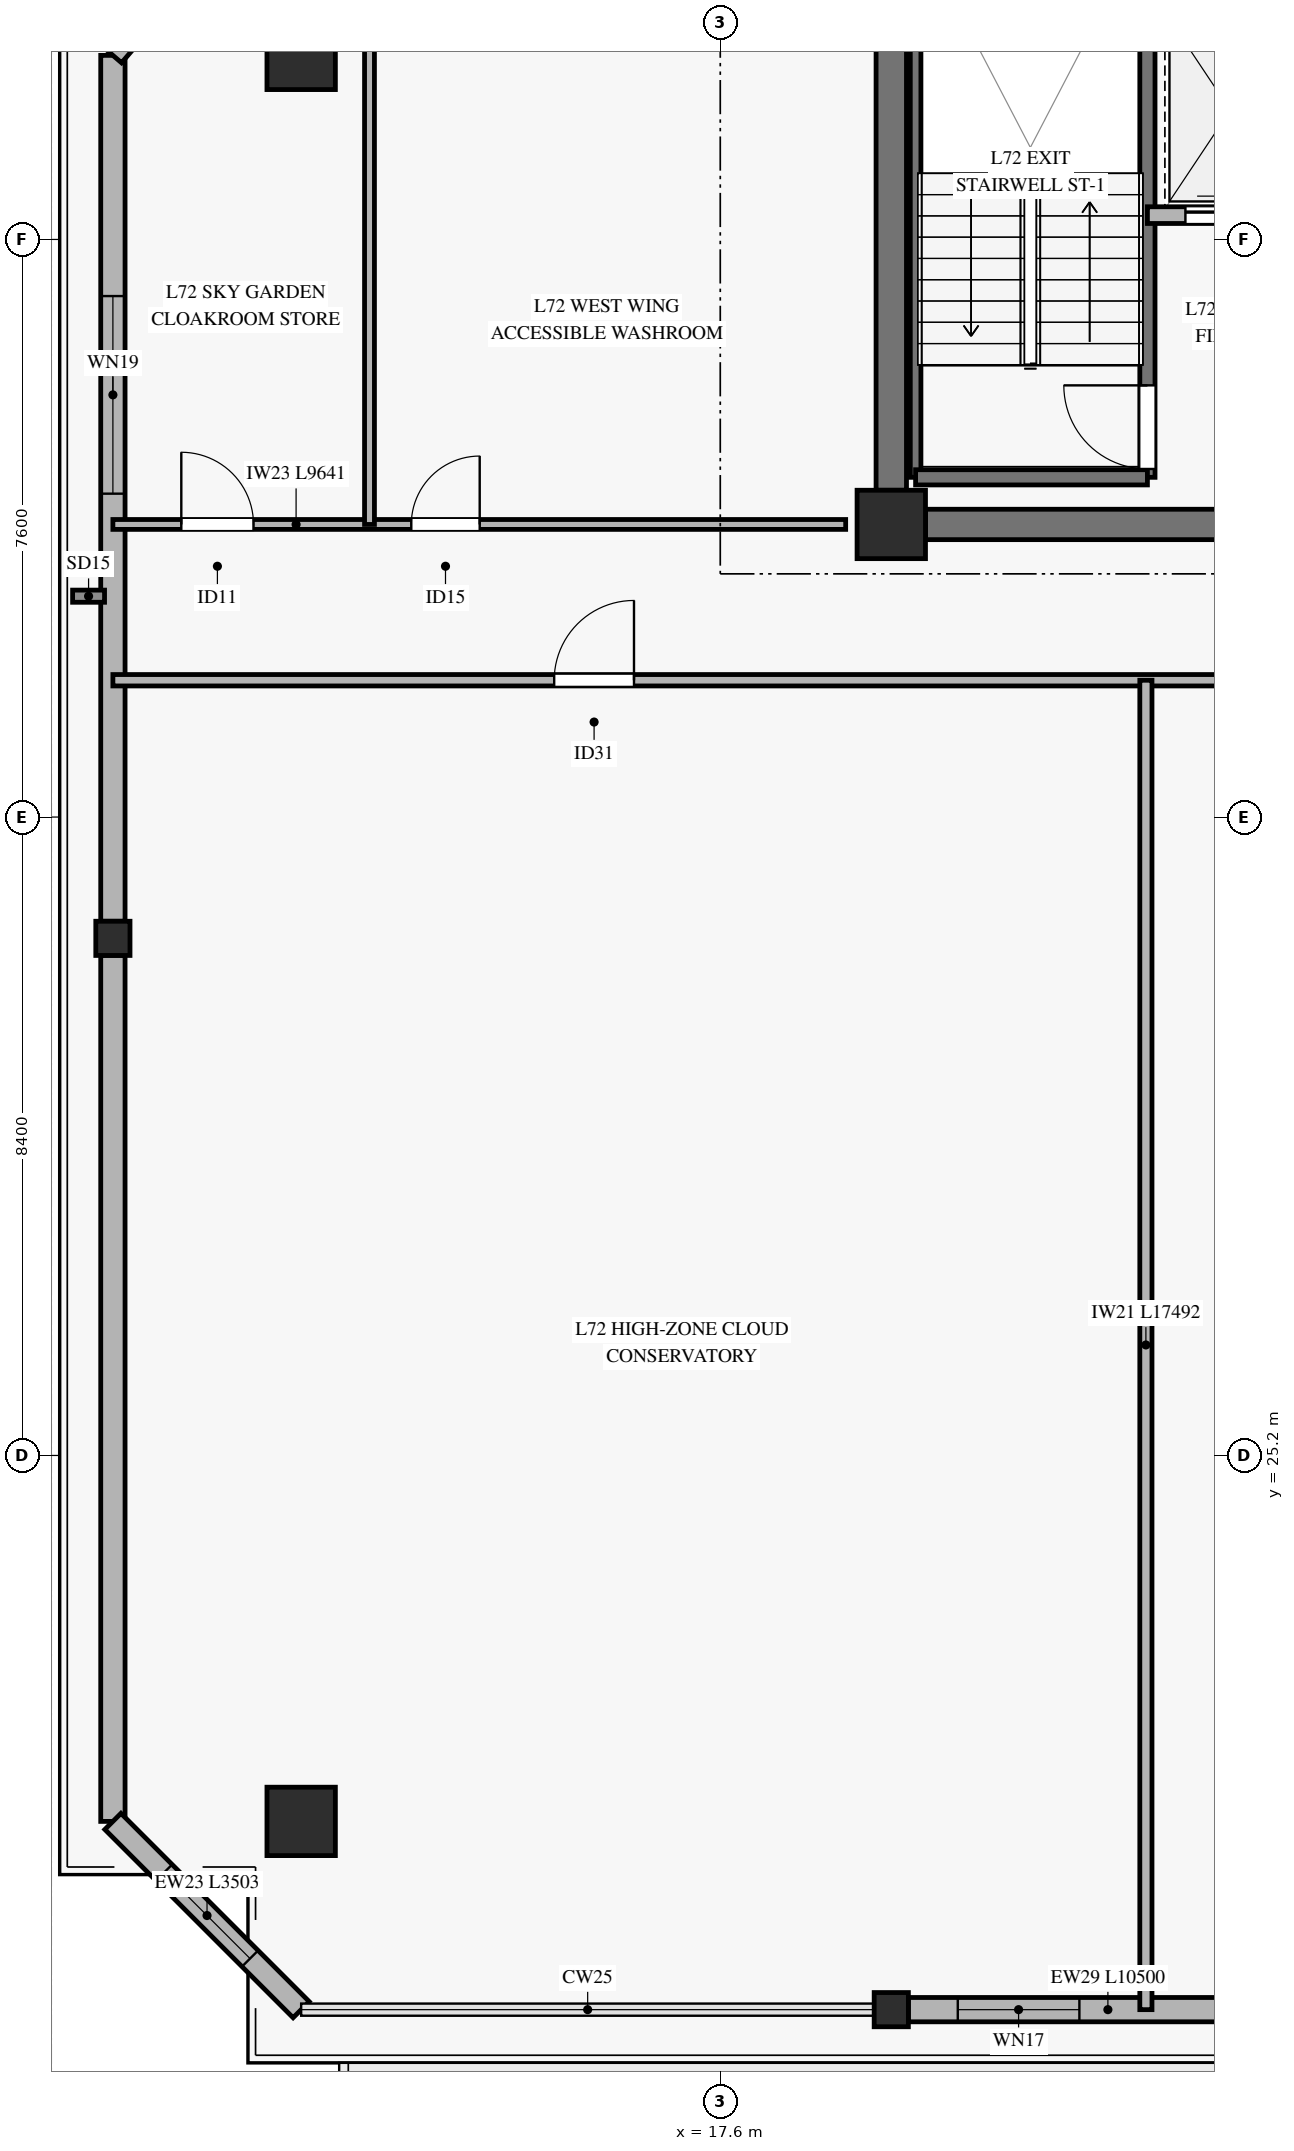
"""IFC4 building model, lengths in metres.
Left out: names, types, materials, properties, quantities, classifications, styles, units other than length and angle.
Written with IfcOpenShell. Run it as: python <this file> out.ifc"""

import sys

from ifc_helpers import new_model, si_unit, direction, frame, frame_2d, origin, origin_2d, place, context, subcontext, project, spatial, rectangle, hollow_rectangle, extrude, source, transform, mapped, element, fill, save


model = new_model("IFC4")
c1 = context("Model", 3, precision=1e-05, world=origin(), true_north=direction((0.0, 1.0)))
c2 = subcontext(c1, "Body", "Model", "MODEL_VIEW")
j1 = project(units=[si_unit("LENGTHUNIT", "METRE"), si_unit("PLANEANGLEUNIT", "RADIAN")], contexts=[c1])
p1 = place(None, origin())
s1 = spatial("IfcSite", under=j1, at=p1, CompositionType="ELEMENT")
p2 = place(p1, origin())
s2 = spatial("IfcBuilding", under=s1, at=p2, CompositionType="ELEMENT")
p3 = place(p2, frame((0.0, 0.0, 279.1)))
s3 = spatial("IfcBuildingStorey", under=s2, at=p3, CompositionType="ELEMENT", Elevation=279.1)
m1 = source(origin(), c2, "Body", "SweptSolid", [
    extrude(rectangle(XDim=0.9, YDim=0.9, at=origin_2d()), origin(), (0.0, 0.0, 1.0), 6.52),
])
p4 = place(p3, frame((19.85, 37.45, 0.0), z_axis=(0.0, 0.0, 1.0), x_axis=(1.0, 0.0, 0.0)))
e1 = element("IfcColumn", 1, at=p4, inside=s3, PredefinedType="PILASTER", context=c2, shape_type="MappedRepresentation", body=[
    mapped(m1, transform((0.0, 0.0, 0.0), x_axis=(1.0, 0.0, 0.0), y_axis=(0.0, 1.0, 0.0), z_axis=(0.0, 0.0, 1.0), scale=1.0)),
])
p5 = place(p3, frame((20.3, 37.45, 0.0), z_axis=(0.0, 0.0, 1.0), x_axis=(1.0, 0.0, 0.0)))
e2 = element("IfcWall", 2, at=p5, inside=s3, PredefinedType="SHEAR", context=c2, shape_type="SweptSolid", body=[
    extrude(rectangle(XDim=10.05, YDim=0.4, at=frame_2d((5.025, 0.0))), origin(), (0.0, 0.0, 1.0), 6.52),
])
p6 = place(p5, frame((4.25, 0.0, 0.0)))
e3 = element("IfcOpeningElement", 3, at=p6, cuts=e2, PredefinedType="OPENING", context=c2, shape_type="SweptSolid", body=[
    extrude(rectangle(XDim=1.2, YDim=2.15, at=frame_2d((0.6, 1.075))), frame((0.0, 0.21, 0.0), z_axis=(0.0, -1.0, 0.0), x_axis=(1.0, 0.0, 0.0)), (0.0, 0.0, 1.0), 0.42),
])
p7 = place(p3, frame((19.85, 37.9, 0.0), z_axis=(0.0, 0.0, 1.0), x_axis=(0.0, 1.0, 0.0)))
e4 = element("IfcWall", 4, at=p7, inside=s3, PredefinedType="SHEAR", context=c2, shape_type="SweptSolid", body=[
    extrude(rectangle(XDim=8.2, YDim=0.4, at=frame_2d((4.1, 0.0))), origin(), (0.0, 0.0, 1.0), 6.52),
])
m2 = source(origin(), c2, "Body", "SweptSolid", [
    extrude(hollow_rectangle(XDim=0.9, YDim=0.9, WallThickness=0.04, at=origin_2d()), origin(), (0.0, 0.0, 1.0), 6.52),
])
for number, where, z_axis, x_axis in (
    (5, (12.086, 20.385, 0.0), (0.0, 0.0, 1.0), (1.0, 0.0, 0.0)),
    (6, (12.086, 43.622, 0.0), (0.0, 0.0, 1.0), (1.0, 0.0, 0.0)),
):
    element("IfcColumn", number, at=place(p3, frame(where, z_axis=z_axis, x_axis=x_axis)), inside=s3, PredefinedType="COLUMN", context=c2, shape_type="MappedRepresentation", body=[
        mapped(m2, transform((0.0, 0.0, 0.0), x_axis=(1.0, 0.0, 0.0), y_axis=(0.0, 1.0, 0.0), z_axis=(0.0, 0.0, 1.0), scale=1.0)),
    ])
m3 = source(origin(), c2, "Body", "SweptSolid", [
    extrude(hollow_rectangle(XDim=0.45, YDim=0.45, WallThickness=0.022, at=origin_2d()), origin(), (0.0, 0.0, 1.0), 6.52),
])
for number, where, z_axis, x_axis in (
    (7, (19.85, 17.908, 0.0), (0.0, 0.0, 1.0), (1.0, 0.0, 0.0)),
    (8, (9.609, 32.004, 0.0), (0.0, 0.0, 1.0), (1.0, 0.0, 0.0)),
):
    element("IfcColumn", number, at=place(p3, frame(where, z_axis=z_axis, x_axis=x_axis)), inside=s3, PredefinedType="COLUMN", context=c2, shape_type="MappedRepresentation", body=[
        mapped(m3, transform((0.0, 0.0, 0.0), x_axis=(1.0, 0.0, 0.0), y_axis=(0.0, 1.0, 0.0), z_axis=(0.0, 0.0, 1.0), scale=1.0)),
    ])
p8 = place(p3, frame((20.075, 17.908, 0.0), z_axis=(0.0, 0.0, 1.0), x_axis=(1.0, 0.0, 0.0)))
e9 = element("IfcWall", 9, at=p8, inside=s3, PredefinedType="SOLIDWALL", context=c2, shape_type="SweptSolid", body=[
    extrude(rectangle(XDim=10.5, YDim=0.32, at=frame_2d((5.25, 0.0))), origin(), (0.0, 0.0, 1.0), 6.15),
])
p9 = place(p8, frame((4.325, 0.0, 0.0)))
e10 = element("IfcOpeningElement", 10, at=p9, cuts=e9, PredefinedType="OPENING", context=c2, shape_type="SweptSolid", body=[
    extrude(rectangle(XDim=1.8, YDim=2.3, at=frame_2d((0.9, 1.15))), frame((0.0, 0.17, 0.0), z_axis=(0.0, -1.0, 0.0), x_axis=(1.0, 0.0, 0.0)), (0.0, 0.0, 1.0), 0.34),
])
p10 = place(p8, frame((0.65, 0.0, 0.45)))
e11 = element("IfcOpeningElement", 11, at=p10, cuts=e9, PredefinedType="OPENING", context=c2, shape_type="SweptSolid", body=[
    extrude(rectangle(XDim=1.6, YDim=2.0, at=frame_2d((0.8, 1.0))), frame((0.0, 0.17, 0.0), z_axis=(0.0, -1.0, 0.0), x_axis=(1.0, 0.0, 0.0)), (0.0, 0.0, 1.0), 0.34),
])
p11 = place(p8, frame((8.25, 0.0, 0.45)))
e12 = element("IfcOpeningElement", 12, at=p11, cuts=e9, PredefinedType="OPENING", context=c2, shape_type="SweptSolid", body=[
    extrude(rectangle(XDim=1.6, YDim=2.0, at=frame_2d((0.8, 1.0))), frame((0.0, 0.17, 0.0), z_axis=(0.0, -1.0, 0.0), x_axis=(1.0, 0.0, 0.0)), (0.0, 0.0, 1.0), 0.34),
])
p12 = place(p3, frame((9.609, 20.385, 0.0), z_axis=(0.0, 0.0, 1.0), x_axis=(0.0, 1.0, 0.0)))
e13 = element("IfcWall", 13, at=p12, inside=s3, PredefinedType="SOLIDWALL", context=c2, shape_type="SweptSolid", body=[
    extrude(rectangle(XDim=11.394, YDim=0.32, at=frame_2d((5.697, 0.0))), origin(), (0.0, 0.0, 1.0), 6.15),
])
p13 = place(p3, frame((9.609, 32.229, 0.0), z_axis=(0.0, 0.0, 1.0), x_axis=(0.0, 1.0, 0.0)))
e14 = element("IfcWall", 14, at=p13, inside=s3, PredefinedType="SOLIDWALL", context=c2, shape_type="SweptSolid", body=[
    extrude(rectangle(XDim=11.393, YDim=0.32, at=frame_2d((5.697, 0.0))), origin(), (0.0, 0.0, 1.0), 6.15),
])
p14 = place(p13, frame((5.626, 0.0, 0.45)))
e15 = element("IfcOpeningElement", 15, at=p14, cuts=e14, PredefinedType="OPENING", context=c2, shape_type="SweptSolid", body=[
    extrude(rectangle(XDim=2.6, YDim=2.4, at=frame_2d((1.3, 1.2))), frame((0.0, 0.17, 0.0), z_axis=(0.0, -1.0, 0.0), x_axis=(1.0, 0.0, 0.0)), (0.0, 0.0, 1.0), 0.34),
])
p15 = place(p3, frame((9.609, 20.385, 0.0), z_axis=(0.0, 0.0, 1.0), x_axis=(0.707106781187, -0.707106781187, 0.0)))
e16 = element("IfcWall", 16, at=p15, inside=s3, PredefinedType="SOLIDWALL", context=c2, shape_type="SweptSolid", body=[
    extrude(rectangle(XDim=3.503, YDim=0.3, at=frame_2d((1.751, 0.0))), origin(), (0.0, 0.0, 1.0), 6.15),
])
p16 = place(p15, frame((0.952, 0.0, 0.45)))
e17 = element("IfcOpeningElement", 17, at=p16, cuts=e16, PredefinedType="OPENING", context=c2, shape_type="SweptSolid", body=[
    extrude(rectangle(XDim=1.6, YDim=2.0, at=frame_2d((0.8, 1.0))), frame((0.0, 0.16, 0.0), z_axis=(0.0, -1.0, 0.0), x_axis=(1.0, 0.0, 0.0)), (0.0, 0.0, 1.0), 0.32),
])
p17 = place(p3, frame((11.861, 46.25, 0.0), z_axis=(0.0, 0.0, 1.0), x_axis=(-0.650739088715, -0.759301414735, 0.0)))
e18 = element("IfcWall", 18, at=p17, inside=s3, PredefinedType="SOLIDWALL", context=c2, shape_type="SweptSolid", body=[
    extrude(rectangle(XDim=3.461, YDim=0.3, at=frame_2d((1.73, 0.0))), origin(), (0.0, 0.0, 1.0), 6.15),
])
p18 = place(p17, frame((0.93, 0.0, 0.45)))
e19 = element("IfcOpeningElement", 19, at=p18, cuts=e18, PredefinedType="OPENING", context=c2, shape_type="SweptSolid", body=[
    extrude(rectangle(XDim=1.6, YDim=2.0, at=frame_2d((0.8, 1.0))), frame((0.0, 0.16, 0.0), z_axis=(0.0, -1.0, 0.0), x_axis=(1.0, 0.0, 0.0)), (0.0, 0.0, 1.0), 0.32),
])
p19 = place(p3, frame((20.17, 38.07, 0.0), z_axis=(0.0, 0.0, 1.0), x_axis=(0.0, 1.0, 0.0)))
e20 = element("IfcWall", 20, at=p19, inside=s3, PredefinedType="SOLIDWALL", context=c2, shape_type="SweptSolid", body=[
    extrude(rectangle(XDim=7.25, YDim=0.14, at=frame_2d((3.625, 0.0))), origin(), (0.0, 0.0, 1.0), 6.8),
])
p20 = place(p3, frame((23.22, 38.07, 0.0), z_axis=(0.0, 0.0, 1.0), x_axis=(0.0, 1.0, 0.0)))
e21 = element("IfcWall", 21, at=p20, inside=s3, PredefinedType="SOLIDWALL", context=c2, shape_type="SweptSolid", body=[
    extrude(rectangle(XDim=7.25, YDim=0.2, at=frame_2d((3.625, 0.0))), origin(), (0.0, 0.0, 1.0), 6.8),
])
p21 = place(p20, frame((0.11, 0.0, 0.0)))
e22 = element("IfcOpeningElement", 22, at=p21, cuts=e21, PredefinedType="OPENING", context=c2, shape_type="SweptSolid", body=[
    extrude(rectangle(XDim=1.1, YDim=2.15, at=frame_2d((0.55, 1.075))), frame((0.0, 0.11, 0.0), z_axis=(0.0, -1.0, 0.0), x_axis=(1.0, 0.0, 0.0)), (0.0, 0.0, 1.0), 0.22),
])
p22 = place(p3, frame((20.17, 38.07, 0.0), z_axis=(0.0, 0.0, 1.0), x_axis=(1.0, 0.0, 0.0)))
e23 = element("IfcWall", 23, at=p22, inside=s3, PredefinedType="SOLIDWALL", context=c2, shape_type="SweptSolid", body=[
    extrude(rectangle(XDim=3.05, YDim=0.2, at=frame_2d((1.525, 0.0))), origin(), (0.0, 0.0, 1.0), 6.8),
])
p23 = place(p3, frame((23.22, 41.52, 0.0), z_axis=(0.0, 0.0, 1.0), x_axis=(1.0, 0.0, 0.0)))
e24 = element("IfcWall", 24, at=p23, inside=s3, PredefinedType="SOLIDWALL", context=c2, shape_type="SweptSolid", body=[
    extrude(rectangle(XDim=3.92, YDim=0.22, at=frame_2d((1.96, 0.0))), origin(), (0.0, 0.0, 1.0), 6.52),
])
p24 = place(p23, frame((0.5, 0.0, 0.0)))
e25 = element("IfcOpeningElement", 25, at=p24, cuts=e24, PredefinedType="OPENING", context=c2, shape_type="SweptSolid", body=[
    extrude(rectangle(XDim=1.1, YDim=2.2, at=frame_2d((0.55, 1.1))), frame((0.0, 0.12, 0.0), z_axis=(0.0, -1.0, 0.0), x_axis=(1.0, 0.0, 0.0)), (0.0, 0.0, 1.0), 0.24),
])
p25 = place(p23, frame((2.4, 0.0, 0.0)))
e26 = element("IfcOpeningElement", 26, at=p25, cuts=e24, PredefinedType="OPENING", context=c2, shape_type="SweptSolid", body=[
    extrude(rectangle(XDim=1.1, YDim=2.2, at=frame_2d((0.55, 1.1))), frame((0.0, 0.12, 0.0), z_axis=(0.0, -1.0, 0.0), x_axis=(1.0, 0.0, 0.0)), (0.0, 0.0, 1.0), 0.24),
])
p26 = place(p3, frame((9.609, 35.4, 0.0), z_axis=(0.0, 0.0, 1.0), x_axis=(1.0, 0.0, 0.0)))
e27 = element("IfcWall", 27, at=p26, inside=s3, PredefinedType="PARTITIONING", context=c2, shape_type="SweptSolid", body=[
    extrude(rectangle(XDim=51.182, YDim=0.15, at=frame_2d((25.591, 0.0))), origin(), (0.0, 0.0, 1.0), 5.805),
])
p27 = place(p26, frame((5.806, 0.0, 0.0)))
e28 = element("IfcOpeningElement", 28, at=p27, cuts=e27, PredefinedType="OPENING", context=c2, shape_type="SweptSolid", body=[
    extrude(rectangle(XDim=1.05, YDim=2.15, at=frame_2d((0.525, 1.075))), frame((0.0, 0.085, 0.0), z_axis=(0.0, -1.0, 0.0), x_axis=(1.0, 0.0, 0.0)), (0.0, 0.0, 1.0), 0.17),
])
p28 = place(p26, frame((18.241, 0.0, 0.0)))
e29 = element("IfcOpeningElement", 29, at=p28, cuts=e27, PredefinedType="OPENING", context=c2, shape_type="SweptSolid", body=[
    extrude(rectangle(XDim=1.05, YDim=2.15, at=frame_2d((0.525, 1.075))), frame((0.0, 0.085, 0.0), z_axis=(0.0, -1.0, 0.0), x_axis=(1.0, 0.0, 0.0)), (0.0, 0.0, 1.0), 0.17),
])
p29 = place(p26, frame((27.881, 0.0, 0.0)))
e30 = element("IfcOpeningElement", 30, at=p29, cuts=e27, PredefinedType="OPENING", context=c2, shape_type="SweptSolid", body=[
    extrude(rectangle(XDim=1.05, YDim=2.15, at=frame_2d((0.525, 1.075))), frame((0.0, 0.085, 0.0), z_axis=(0.0, -1.0, 0.0), x_axis=(1.0, 0.0, 0.0)), (0.0, 0.0, 1.0), 0.17),
])
p30 = place(p26, frame((35.401, 0.0, 0.0)))
e31 = element("IfcOpeningElement", 31, at=p30, cuts=e27, PredefinedType="OPENING", context=c2, shape_type="SweptSolid", body=[
    extrude(rectangle(XDim=1.05, YDim=2.15, at=frame_2d((0.525, 1.075))), frame((0.0, 0.085, 0.0), z_axis=(0.0, -1.0, 0.0), x_axis=(1.0, 0.0, 0.0)), (0.0, 0.0, 1.0), 0.17),
])
p31 = place(p26, frame((44.397, 0.0, 0.0)))
e32 = element("IfcOpeningElement", 32, at=p31, cuts=e27, PredefinedType="OPENING", context=c2, shape_type="SweptSolid", body=[
    extrude(rectangle(XDim=1.05, YDim=2.15, at=frame_2d((0.525, 1.075))), frame((0.0, 0.085, 0.0), z_axis=(0.0, -1.0, 0.0), x_axis=(1.0, 0.0, 0.0)), (0.0, 0.0, 1.0), 0.17),
])
p32 = place(p3, frame((23.2, 17.908, 0.0), z_axis=(0.0, 0.0, 1.0), x_axis=(0.0, 1.0, 0.0)))
e33 = element("IfcWall", 33, at=p32, inside=s3, PredefinedType="PARTITIONING", context=c2, shape_type="SweptSolid", body=[
    extrude(rectangle(XDim=17.492, YDim=0.16, at=frame_2d((8.746, 0.0))), origin(), (0.0, 0.0, 1.0), 6.105),
])
p33 = place(p3, frame((9.609, 37.45, 0.0), z_axis=(0.0, 0.0, 1.0), x_axis=(1.0, 0.0, 0.0)))
e34 = element("IfcWall", 34, at=p33, inside=s3, PredefinedType="PARTITIONING", context=c2, shape_type="SweptSolid", body=[
    extrude(rectangle(XDim=9.641, YDim=0.13, at=frame_2d((4.821, 0.0))), origin(), (0.0, 0.0, 1.0), 6.155),
])
p34 = place(p33, frame((0.9, 0.0, 0.0)))
e35 = element("IfcOpeningElement", 35, at=p34, cuts=e34, PredefinedType="OPENING", context=c2, shape_type="SweptSolid", body=[
    extrude(rectangle(XDim=0.95, YDim=2.1, at=frame_2d((0.475, 1.05))), frame((0.0, 0.075, 0.0), z_axis=(0.0, -1.0, 0.0), x_axis=(1.0, 0.0, 0.0)), (0.0, 0.0, 1.0), 0.15),
])
p35 = place(p33, frame((3.926, 0.0, 0.0)))
e36 = element("IfcOpeningElement", 36, at=p35, cuts=e34, PredefinedType="OPENING", context=c2, shape_type="SweptSolid", body=[
    extrude(rectangle(XDim=0.9, YDim=2.1, at=frame_2d((0.45, 1.05))), frame((0.0, 0.075, 0.0), z_axis=(0.0, -1.0, 0.0), x_axis=(1.0, 0.0, 0.0)), (0.0, 0.0, 1.0), 0.15),
])
p36 = place(p3, frame((12.985, 37.45, 0.0), z_axis=(0.0, 0.0, 1.0), x_axis=(0.0, 1.0, 0.0)))
e37 = element("IfcWall", 37, at=p36, inside=s3, PredefinedType="PARTITIONING", context=c2, shape_type="SweptSolid", body=[
    extrude(rectangle(XDim=8.8, YDim=0.13, at=frame_2d((4.4, 0.0))), origin(), (0.0, 0.0, 1.0), 6.52),
])
m4 = source(origin(), c2, "Body", "SweptSolid", [
    extrude(rectangle(XDim=1.6, YDim=2.0, at=frame_2d((0.8, 1.0))), frame((0.0, 0.03, 0.0), z_axis=(0.0, -1.0, 0.0), x_axis=(1.0, 0.0, 0.0)), (0.0, 0.0, 1.0), 0.06),
])
p37 = place(p10, origin())
e38 = element("IfcWindow", 38, at=p37, inside=s3, PartitioningType="SINGLE_PANEL", PredefinedType="WINDOW", context=c2, shape_type="MappedRepresentation", body=[
    mapped(m4, transform((0.0, 0.0, 0.0), x_axis=(1.0, 0.0, 0.0), y_axis=(0.0, 1.0, 0.0), z_axis=(0.0, 0.0, 1.0), scale=1.0)),
])
fill(e11, e38)
m5 = source(origin(), c2, "Body", "SweptSolid", [
    extrude(rectangle(XDim=2.6, YDim=2.4, at=frame_2d((1.3, 1.2))), frame((0.0, 0.03, 0.0), z_axis=(0.0, -1.0, 0.0), x_axis=(1.0, 0.0, 0.0)), (0.0, 0.0, 1.0), 0.06),
])
p38 = place(p14, origin())
e39 = element("IfcWindow", 39, at=p38, inside=s3, PartitioningType="SINGLE_PANEL", PredefinedType="WINDOW", context=c2, shape_type="MappedRepresentation", body=[
    mapped(m5, transform((0.0, 0.0, 0.0), x_axis=(1.0, 0.0, 0.0), y_axis=(0.0, 1.0, 0.0), z_axis=(0.0, 0.0, 1.0), scale=1.0)),
])
fill(e15, e39)
p39 = place(p16, origin())
e40 = element("IfcWindow", 40, at=p39, inside=s3, PartitioningType="SINGLE_PANEL", PredefinedType="WINDOW", context=c2, shape_type="MappedRepresentation", body=[
    mapped(m4, transform((0.0, 0.0, 0.0), x_axis=(1.0, 0.0, 0.0), y_axis=(0.0, 1.0, 0.0), z_axis=(0.0, 0.0, 1.0), scale=1.0)),
])
fill(e17, e40)
m6 = source(origin(), c2, "Body", "SweptSolid", [
    extrude(rectangle(XDim=1.1, YDim=2.15, at=frame_2d((0.55, 1.075))), frame((0.0, 0.025, 0.0), z_axis=(0.0, -1.0, 0.0), x_axis=(1.0, 0.0, 0.0)), (0.0, 0.0, 1.0), 0.05),
])
p40 = place(p21, origin())
e41 = element("IfcDoor", 41, at=p40, inside=s3, OperationType="SINGLE_SWING_RIGHT", PredefinedType="DOOR", context=c2, shape_type="MappedRepresentation", body=[
    mapped(m6, transform((0.0, 0.0, 0.0), x_axis=(1.0, 0.0, 0.0), y_axis=(0.0, 1.0, 0.0), z_axis=(0.0, 0.0, 1.0), scale=1.0)),
])
fill(e22, e41)
m7 = source(origin(), c2, "Body", "SweptSolid", [
    extrude(rectangle(XDim=1.1, YDim=2.2, at=frame_2d((0.55, 1.1))), frame((0.0, 0.025, 0.0), z_axis=(0.0, -1.0, 0.0), x_axis=(1.0, 0.0, 0.0)), (0.0, 0.0, 1.0), 0.05),
])
p41 = place(p24, origin())
e42 = element("IfcDoor", 42, at=p41, inside=s3, OperationType="SLIDING_TO_LEFT", PredefinedType="DOOR", context=c2, shape_type="MappedRepresentation", body=[
    mapped(m7, transform((0.0, 0.0, 0.0), x_axis=(1.0, 0.0, 0.0), y_axis=(0.0, 1.0, 0.0), z_axis=(0.0, 0.0, 1.0), scale=1.0)),
])
fill(e25, e42)
m8 = source(origin(), c2, "Body", "SweptSolid", [
    extrude(rectangle(XDim=1.05, YDim=2.15, at=frame_2d((0.525, 1.075))), frame((0.0, 0.025, 0.0), z_axis=(0.0, -1.0, 0.0), x_axis=(1.0, 0.0, 0.0)), (0.0, 0.0, 1.0), 0.05),
])
p42 = place(p27, origin())
e43 = element("IfcDoor", 43, at=p42, inside=s3, OperationType="SINGLE_SWING_RIGHT", PredefinedType="DOOR", context=c2, shape_type="MappedRepresentation", body=[
    mapped(m8, transform((0.0, 0.0, 0.0), x_axis=(1.0, 0.0, 0.0), y_axis=(0.0, 1.0, 0.0), z_axis=(0.0, 0.0, 1.0), scale=1.0)),
])
fill(e28, e43)
m9 = source(origin(), c2, "Body", "SweptSolid", [
    extrude(rectangle(XDim=0.95, YDim=2.1, at=frame_2d((0.475, 1.05))), frame((0.0, 0.025, 0.0), z_axis=(0.0, -1.0, 0.0), x_axis=(1.0, 0.0, 0.0)), (0.0, 0.0, 1.0), 0.05),
])
p43 = place(p34, origin())
e44 = element("IfcDoor", 44, at=p43, inside=s3, OperationType="SINGLE_SWING_LEFT", PredefinedType="DOOR", context=c2, shape_type="MappedRepresentation", body=[
    mapped(m9, transform((0.0, 0.0, 0.0), x_axis=(1.0, 0.0, 0.0), y_axis=(0.0, 1.0, 0.0), z_axis=(0.0, 0.0, 1.0), scale=1.0)),
])
fill(e35, e44)
m10 = source(origin(), c2, "Body", "SweptSolid", [
    extrude(rectangle(XDim=0.9, YDim=2.1, at=frame_2d((0.45, 1.05))), frame((0.0, 0.025, 0.0), z_axis=(0.0, -1.0, 0.0), x_axis=(1.0, 0.0, 0.0)), (0.0, 0.0, 1.0), 0.05),
])
p44 = place(p35, origin())
e45 = element("IfcDoor", 45, at=p44, inside=s3, OperationType="SINGLE_SWING_RIGHT", PredefinedType="DOOR", context=c2, shape_type="MappedRepresentation", body=[
    mapped(m10, transform((0.0, 0.0, 0.0), x_axis=(1.0, 0.0, 0.0), y_axis=(0.0, 1.0, 0.0), z_axis=(0.0, 0.0, 1.0), scale=1.0)),
])
fill(e36, e45)
save(model, sys.argv[1])
